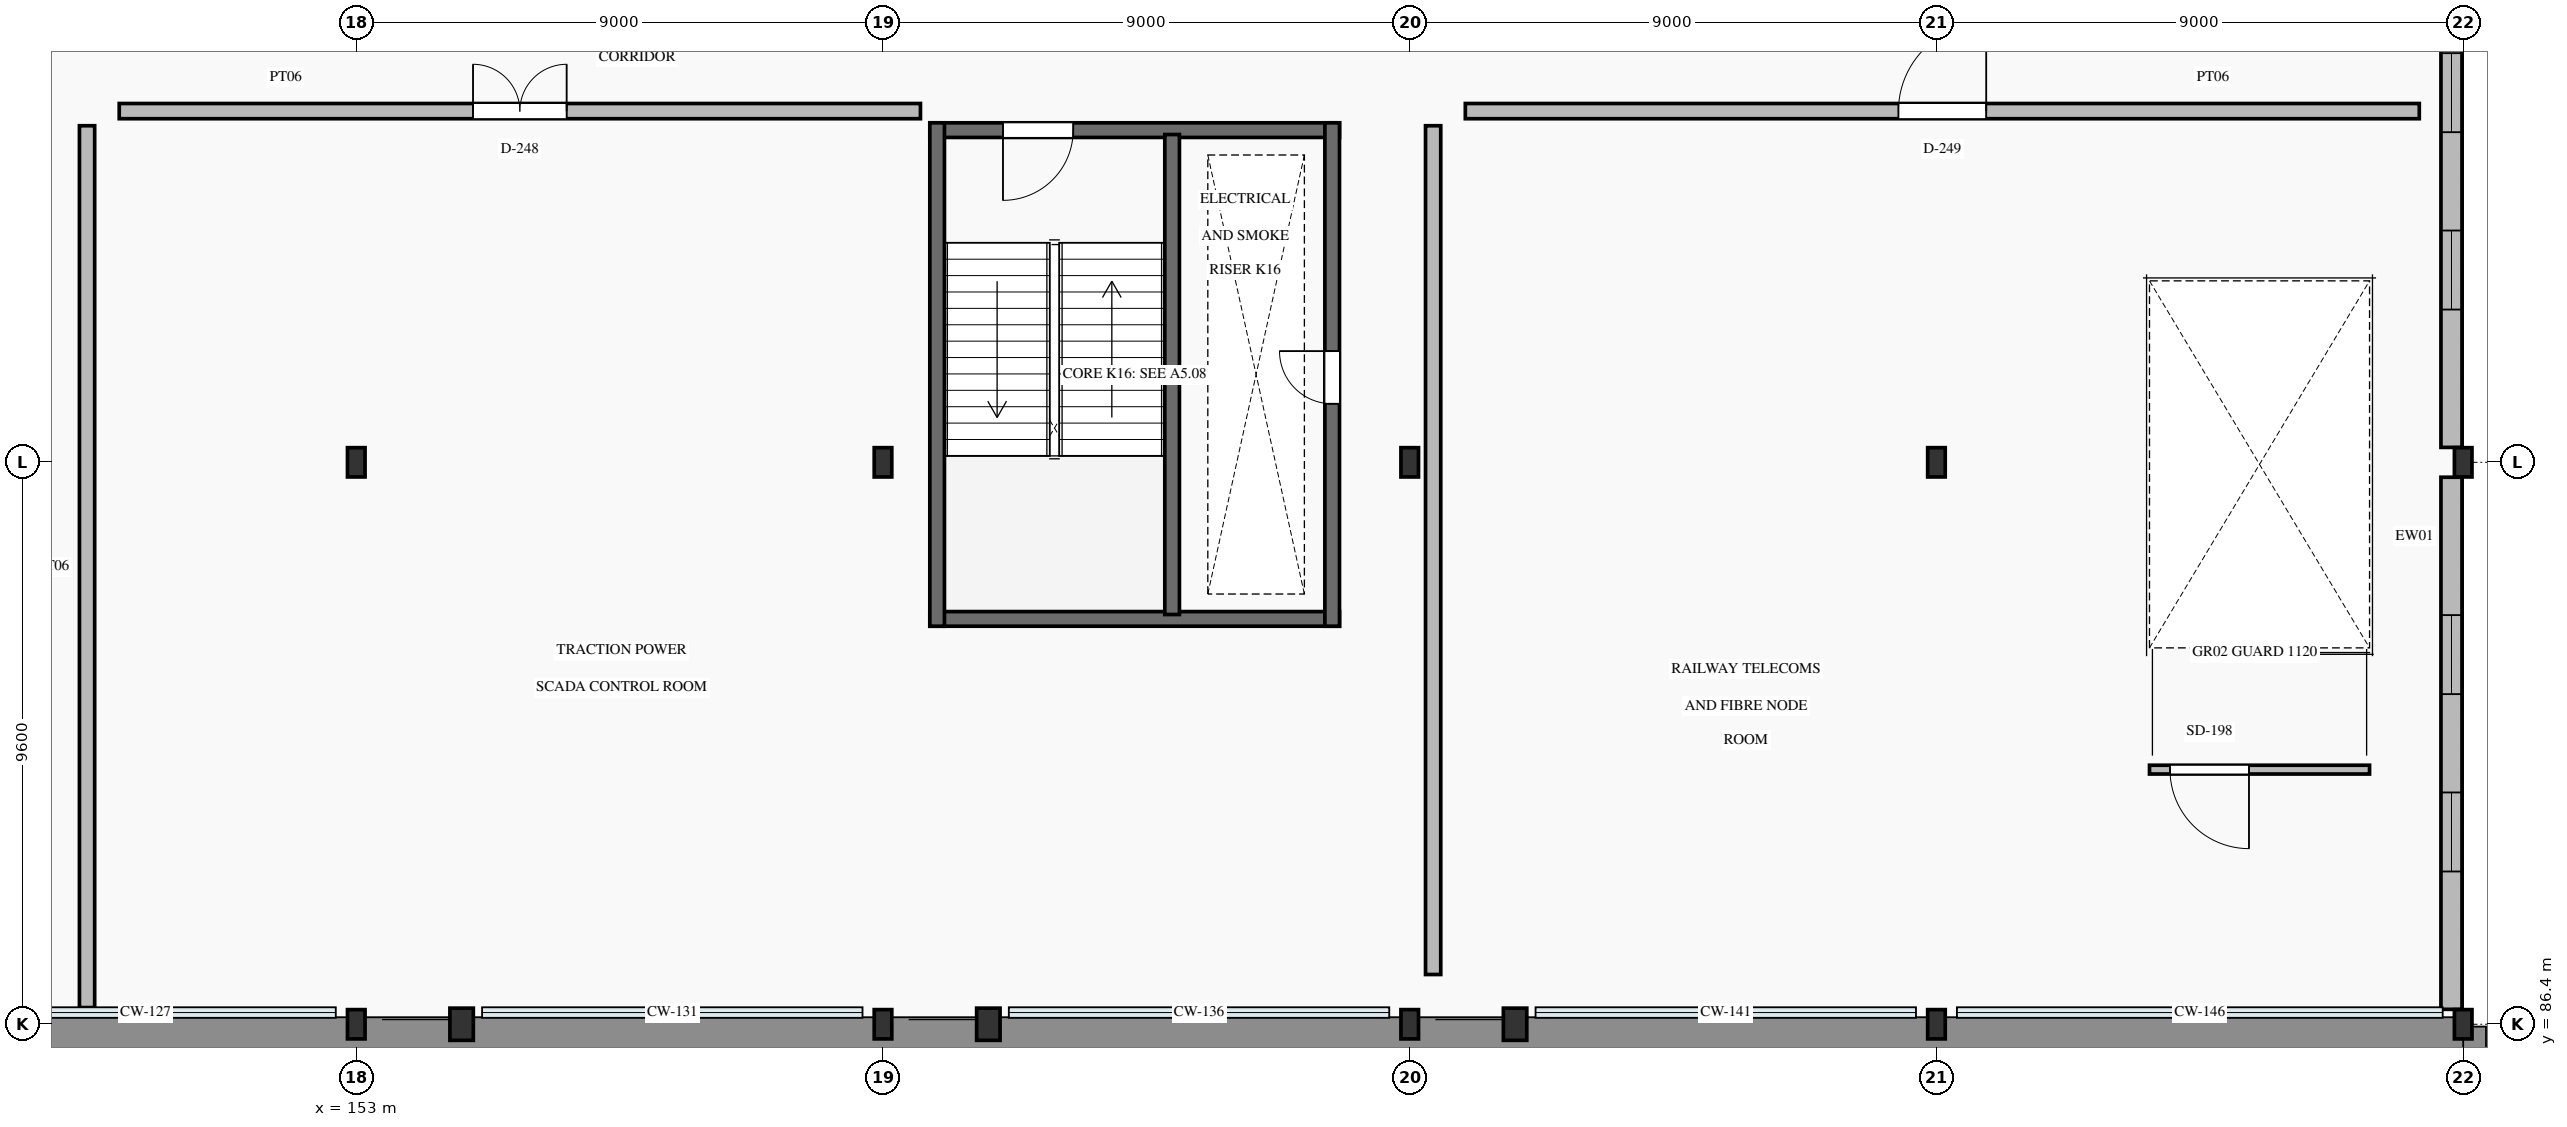
"""IFC4 building model, lengths in metres.
Left out: names, types, materials, properties, quantities, classifications, styles, units other than length and angle.
Written with IfcOpenShell. Run it as: python <this file> out.ifc"""

import sys

from ifc_helpers import new_model, si_unit, direction, frame, frame_2d, origin, origin_2d, place, context, subcontext, project, spatial, rectangle, i_section, extrude, element, fill, save


model = new_model("IFC4")
c1 = context("Model", 3, precision=1e-05, world=origin(), true_north=direction((0.0, 1.0)))
c2 = subcontext(c1, "Body", "Model", "MODEL_VIEW")
j1 = project(units=[si_unit("LENGTHUNIT", "METRE"), si_unit("PLANEANGLEUNIT", "RADIAN")], contexts=[c1])
p1 = place(None, origin())
s1 = spatial("IfcSite", under=j1, at=p1, CompositionType="ELEMENT")
p2 = place(p1, origin())
s2 = spatial("IfcBuilding", under=s1, at=p2, CompositionType="ELEMENT")
p3 = place(p2, frame((0.0, 0.0, 6.0)))
s3 = spatial("IfcBuildingStorey", under=s2, at=p3, CompositionType="ELEMENT", Elevation=6.0)
for number, where, z_axis, x_axis in (
    (1, (153.0, 86.4, 0.0), (0.0, 0.0, 1.0), (1.0, 0.0, 0.0)),
    (2, (153.0, 96.0, 0.0), (0.0, 0.0, 1.0), (1.0, 0.0, 0.0)),
    (3, (162.0, 86.4, 0.0), (0.0, 0.0, 1.0), (1.0, 0.0, 0.0)),
    (4, (162.0, 96.0, 0.0), (0.0, 0.0, 1.0), (1.0, 0.0, 0.0)),
    (5, (171.0, 86.4, 0.0), (0.0, 0.0, 1.0), (1.0, 0.0, 0.0)),
    (6, (171.0, 96.0, 0.0), (0.0, 0.0, 1.0), (1.0, 0.0, 0.0)),
    (7, (180.0, 86.4, 0.0), (0.0, 0.0, 1.0), (1.0, 0.0, 0.0)),
    (8, (180.0, 96.0, 0.0), (0.0, 0.0, 1.0), (1.0, 0.0, 0.0)),
    (9, (189.0, 86.4, 0.0), (0.0, 0.0, 1.0), (1.0, 0.0, 0.0)),
    (10, (189.0, 96.0, 0.0), (0.0, 0.0, 1.0), (1.0, 0.0, 0.0)),
):
    element("IfcColumn", number, at=place(p3, frame(where, z_axis=z_axis, x_axis=x_axis)), inside=s3, PredefinedType="COLUMN", context=c2, shape_type="SweptSolid", body=[
        extrude(i_section(OverallWidth=0.3, OverallDepth=0.5, WebThickness=0.014, FlangeThickness=0.028, FilletRadius=0.027, at=origin_2d()), origin(), (0.0, 0.0, 1.0), 4.8),
    ])
for number, where, z_axis, x_axis in (
    (11, (154.8, 86.4, 0.0), (0.0, 0.0, 1.0), (1.0, 0.0, 0.0)),
    (12, (163.8, 86.4, 0.0), (0.0, 0.0, 1.0), (1.0, 0.0, 0.0)),
    (13, (172.8, 86.4, 0.0), (0.0, 0.0, 1.0), (1.0, 0.0, 0.0)),
):
    element("IfcColumn", number, at=place(p3, frame(where, z_axis=z_axis, x_axis=x_axis)), inside=s3, PredefinedType="PILASTER", context=c2, shape_type="SweptSolid", body=[
        extrude(rectangle(XDim=0.4, YDim=0.55, at=origin_2d()), origin(), (0.0, 0.0, 1.0), 4.8),
    ])
p4 = place(p3, frame((188.8, 86.655, 0.0), z_axis=(0.0, 0.0, 1.0), x_axis=(0.0, 1.0, 0.0)))
e14 = element("IfcWall", 14, at=p4, inside=s3, PredefinedType="SOLIDWALL", context=c2, shape_type="SweptSolid", body=[
    extrude(rectangle(XDim=9.09, YDim=0.36, at=frame_2d((4.545, 0.0))), origin(), (0.0, 0.0, 1.0), 4.28),
])
p5 = place(p4, frame((2.355, 0.0, 0.95)))
e15 = element("IfcOpeningElement", 15, at=p5, cuts=e14, PredefinedType="OPENING", context=c2, shape_type="SweptSolid", body=[
    extrude(rectangle(XDim=1.35, YDim=1.95, at=frame_2d((0.675, 0.975))), frame((0.0, 0.195, 0.0), z_axis=(0.0, -1.0, 0.0), x_axis=(1.0, 0.0, 0.0)), (0.0, 0.0, 1.0), 0.39),
])
p6 = place(p4, frame((5.385, 0.0, 0.95)))
e16 = element("IfcOpeningElement", 16, at=p6, cuts=e14, PredefinedType="OPENING", context=c2, shape_type="SweptSolid", body=[
    extrude(rectangle(XDim=1.35, YDim=1.95, at=frame_2d((0.675, 0.975))), frame((0.0, 0.195, 0.0), z_axis=(0.0, -1.0, 0.0), x_axis=(1.0, 0.0, 0.0)), (0.0, 0.0, 1.0), 0.39),
])
p7 = place(p3, frame((188.8, 96.255, 0.0), z_axis=(0.0, 0.0, 1.0), x_axis=(0.0, 1.0, 0.0)))
e17 = element("IfcWall", 17, at=p7, inside=s3, PredefinedType="SOLIDWALL", context=c2, shape_type="SweptSolid", body=[
    extrude(rectangle(XDim=9.09, YDim=0.36, at=frame_2d((4.545, 0.0))), origin(), (0.0, 0.0, 1.0), 4.28),
])
p8 = place(p7, frame((2.355, 0.0, 0.95)))
e18 = element("IfcOpeningElement", 18, at=p8, cuts=e17, PredefinedType="OPENING", context=c2, shape_type="SweptSolid", body=[
    extrude(rectangle(XDim=1.35, YDim=1.95, at=frame_2d((0.675, 0.975))), frame((0.0, 0.195, 0.0), z_axis=(0.0, -1.0, 0.0), x_axis=(1.0, 0.0, 0.0)), (0.0, 0.0, 1.0), 0.39),
])
p9 = place(p7, frame((5.385, 0.0, 0.95)))
e19 = element("IfcOpeningElement", 19, at=p9, cuts=e17, PredefinedType="OPENING", context=c2, shape_type="SweptSolid", body=[
    extrude(rectangle(XDim=1.35, YDim=1.95, at=frame_2d((0.675, 0.975))), frame((0.0, 0.195, 0.0), z_axis=(0.0, -1.0, 0.0), x_axis=(1.0, 0.0, 0.0)), (0.0, 0.0, 1.0), 0.39),
])
p10 = place(p3, frame((162.8, 93.325, 0.0), z_axis=(0.0, 0.0, 1.0), x_axis=(1.0, 0.0, 0.0)))
e20 = element("IfcWall", 20, at=p10, inside=s3, PredefinedType="SHEAR", context=c2, shape_type="SweptSolid", body=[
    extrude(rectangle(XDim=7.0, YDim=0.25, at=frame_2d((3.5, 0.0))), origin(), (0.0, 0.0, 1.0), 4.8),
])
p11 = place(p3, frame((162.8, 101.675, 0.0), z_axis=(0.0, 0.0, 1.0), x_axis=(1.0, 0.0, 0.0)))
e21 = element("IfcWall", 21, at=p11, inside=s3, PredefinedType="SHEAR", context=c2, shape_type="SweptSolid", body=[
    extrude(rectangle(XDim=7.0, YDim=0.25, at=frame_2d((3.5, 0.0))), origin(), (0.0, 0.0, 1.0), 4.8),
])
p12 = place(p11, frame((1.25, 0.0, 0.0)))
e22 = element("IfcOpeningElement", 22, at=p12, cuts=e21, PredefinedType="OPENING", context=c2, shape_type="SweptSolid", body=[
    extrude(rectangle(XDim=1.2, YDim=2.15, at=frame_2d((0.6, 1.075))), frame((0.0, 0.14, 0.0), z_axis=(0.0, -1.0, 0.0), x_axis=(1.0, 0.0, 0.0)), (0.0, 0.0, 1.0), 0.28),
])
p13 = place(p3, frame((162.925, 93.2, 0.0), z_axis=(0.0, 0.0, 1.0), x_axis=(0.0, 1.0, 0.0)))
e23 = element("IfcWall", 23, at=p13, inside=s3, PredefinedType="SHEAR", context=c2, shape_type="SweptSolid", body=[
    extrude(rectangle(XDim=8.6, YDim=0.25, at=frame_2d((4.3, 0.0))), origin(), (0.0, 0.0, 1.0), 4.8),
])
p14 = place(p3, frame((169.675, 93.2, 0.0), z_axis=(0.0, 0.0, 1.0), x_axis=(0.0, 1.0, 0.0)))
e24 = element("IfcWall", 24, at=p14, inside=s3, PredefinedType="SHEAR", context=c2, shape_type="SweptSolid", body=[
    extrude(rectangle(XDim=8.6, YDim=0.25, at=frame_2d((4.3, 0.0))), origin(), (0.0, 0.0, 1.0), 4.8),
])
p15 = place(p14, frame((3.8, 0.0, 0.0)))
e25 = element("IfcOpeningElement", 25, at=p15, cuts=e24, PredefinedType="OPENING", context=c2, shape_type="SweptSolid", body=[
    extrude(rectangle(XDim=0.9, YDim=2.05, at=frame_2d((0.45, 1.025))), frame((0.0, 0.14, 0.0), z_axis=(0.0, -1.0, 0.0), x_axis=(1.0, 0.0, 0.0)), (0.0, 0.0, 1.0), 0.28),
])
p16 = place(p3, frame((166.94, 93.4, 0.0), z_axis=(0.0, 0.0, 1.0), x_axis=(0.0, 1.0, 0.0)))
e26 = element("IfcWall", 26, at=p16, inside=s3, PredefinedType="SHEAR", context=c2, shape_type="SweptSolid", body=[
    extrude(rectangle(XDim=8.2, YDim=0.25, at=frame_2d((4.1, 0.0))), origin(), (0.0, 0.0, 1.0), 4.8),
])
p17 = place(p3, frame((183.64, 90.75, 0.0), z_axis=(0.0, 0.0, 1.0), x_axis=(1.0, 0.0, 0.0)))
e27 = element("IfcWall", 27, at=p17, inside=s3, PredefinedType="PARTITIONING", context=c2, shape_type="SweptSolid", body=[
    extrude(rectangle(XDim=3.76, YDim=0.15, at=frame_2d((1.88, 0.0))), origin(), (0.0, 0.0, 1.0), 4.53),
])
p18 = place(p17, frame((0.35, 0.0, 0.0)))
e28 = element("IfcOpeningElement", 28, at=p18, cuts=e27, PredefinedType="OPENING", context=c2, shape_type="SweptSolid", body=[
    extrude(rectangle(XDim=1.35, YDim=2.2, at=frame_2d((0.675, 1.1))), frame((0.0, 0.09, 0.0), z_axis=(0.0, -1.0, 0.0), x_axis=(1.0, 0.0, 0.0)), (0.0, 0.0, 1.0), 0.18),
])
p19 = place(p3, frame((148.95, 102.0, 0.0), z_axis=(0.0, 0.0, 1.0), x_axis=(1.0, 0.0, 0.0)))
e29 = element("IfcWall", 29, at=p19, inside=s3, PredefinedType="PARTITIONING", context=c2, shape_type="SweptSolid", body=[
    extrude(rectangle(XDim=13.69, YDim=0.26, at=frame_2d((6.845, 0.0))), origin(), (0.0, 0.0, 1.0), 4.53),
])
p20 = place(p19, frame((6.045, 0.0, 0.0)))
e30 = element("IfcOpeningElement", 30, at=p20, cuts=e29, PredefinedType="OPENING", context=c2, shape_type="SweptSolid", body=[
    extrude(rectangle(XDim=1.6, YDim=2.25, at=frame_2d((0.8, 1.125))), frame((0.0, 0.145, 0.0), z_axis=(0.0, -1.0, 0.0), x_axis=(1.0, 0.0, 0.0)), (0.0, 0.0, 1.0), 0.29),
])
p21 = place(p3, frame((171.95, 102.0, 0.0), z_axis=(0.0, 0.0, 1.0), x_axis=(1.0, 0.0, 0.0)))
e31 = element("IfcWall", 31, at=p21, inside=s3, PredefinedType="PARTITIONING", context=c2, shape_type="SweptSolid", body=[
    extrude(rectangle(XDim=16.3, YDim=0.26, at=frame_2d((8.15, 0.0))), origin(), (0.0, 0.0, 1.0), 4.53),
])
p22 = place(p21, frame((7.4, 0.0, 0.0)))
e32 = element("IfcOpeningElement", 32, at=p22, cuts=e31, PredefinedType="OPENING", context=c2, shape_type="SweptSolid", body=[
    extrude(rectangle(XDim=1.5, YDim=2.25, at=frame_2d((0.75, 1.125))), frame((0.0, 0.145, 0.0), z_axis=(0.0, -1.0, 0.0), x_axis=(1.0, 0.0, 0.0)), (0.0, 0.0, 1.0), 0.29),
])
p23 = place(p3, frame((148.4, 86.685, 0.0), z_axis=(0.0, 0.0, 1.0), x_axis=(0.0, 1.0, 0.0)))
e33 = element("IfcWall", 33, at=p23, inside=s3, PredefinedType="PARTITIONING", context=c2, shape_type="SweptSolid", body=[
    extrude(rectangle(XDim=15.065, YDim=0.26, at=frame_2d((7.532, 0.0))), origin(), (0.0, 0.0, 1.0), 4.53),
])
p24 = place(p3, frame((171.4, 87.25, 0.0), z_axis=(0.0, 0.0, 1.0), x_axis=(0.0, 1.0, 0.0)))
e34 = element("IfcWall", 34, at=p24, inside=s3, PredefinedType="PARTITIONING", context=c2, shape_type="SweptSolid", body=[
    extrude(rectangle(XDim=14.5, YDim=0.26, at=frame_2d((7.25, 0.0))), origin(), (0.0, 0.0, 1.0), 4.53),
])
p25 = place(p5, origin())
e35 = element("IfcWindow", 35, at=p25, inside=s3, PartitioningType="SINGLE_PANEL", PredefinedType="WINDOW", context=c2, shape_type="SweptSolid", body=[
    extrude(rectangle(XDim=1.35, YDim=1.95, at=frame_2d((0.675, 0.975))), frame((0.0, 0.03, 0.0), z_axis=(0.0, -1.0, 0.0), x_axis=(1.0, 0.0, 0.0)), (0.0, 0.0, 1.0), 0.06),
])
fill(e15, e35)
p26 = place(p6, origin())
e36 = element("IfcWindow", 36, at=p26, inside=s3, PartitioningType="SINGLE_PANEL", PredefinedType="WINDOW", context=c2, shape_type="SweptSolid", body=[
    extrude(rectangle(XDim=1.35, YDim=1.95, at=frame_2d((0.675, 0.975))), frame((0.0, 0.03, 0.0), z_axis=(0.0, -1.0, 0.0), x_axis=(1.0, 0.0, 0.0)), (0.0, 0.0, 1.0), 0.06),
])
fill(e16, e36)
p27 = place(p8, origin())
e37 = element("IfcWindow", 37, at=p27, inside=s3, PartitioningType="SINGLE_PANEL", PredefinedType="WINDOW", context=c2, shape_type="SweptSolid", body=[
    extrude(rectangle(XDim=1.35, YDim=1.95, at=frame_2d((0.675, 0.975))), frame((0.0, 0.03, 0.0), z_axis=(0.0, -1.0, 0.0), x_axis=(1.0, 0.0, 0.0)), (0.0, 0.0, 1.0), 0.06),
])
fill(e18, e37)
p28 = place(p9, origin())
e38 = element("IfcWindow", 38, at=p28, inside=s3, PartitioningType="SINGLE_PANEL", PredefinedType="WINDOW", context=c2, shape_type="SweptSolid", body=[
    extrude(rectangle(XDim=1.35, YDim=1.95, at=frame_2d((0.675, 0.975))), frame((0.0, 0.03, 0.0), z_axis=(0.0, -1.0, 0.0), x_axis=(1.0, 0.0, 0.0)), (0.0, 0.0, 1.0), 0.06),
])
fill(e19, e38)
p29 = place(p12, frame((1.2, 0.0, 0.0), z_axis=(0.0, 0.0, 1.0), x_axis=(-1.0, 0.0, 0.0)))
e39 = element("IfcDoor", 39, at=p29, inside=s3, OperationType="SINGLE_SWING_LEFT", PredefinedType="DOOR", context=c2, shape_type="SweptSolid", body=[
    extrude(rectangle(XDim=1.2, YDim=2.15, at=frame_2d((0.6, 1.075))), frame((0.0, 0.025, 0.0), z_axis=(0.0, -1.0, 0.0), x_axis=(1.0, 0.0, 0.0)), (0.0, 0.0, 1.0), 0.05),
])
fill(e22, e39)
p30 = place(p15, origin())
e40 = element("IfcDoor", 40, at=p30, inside=s3, OperationType="SINGLE_SWING_RIGHT", PredefinedType="DOOR", context=c2, shape_type="SweptSolid", body=[
    extrude(rectangle(XDim=0.9, YDim=2.05, at=frame_2d((0.45, 1.025))), frame((0.0, 0.025, 0.0), z_axis=(0.0, -1.0, 0.0), x_axis=(1.0, 0.0, 0.0)), (0.0, 0.0, 1.0), 0.05),
])
fill(e25, e40)
p31 = place(p18, frame((1.35, 0.0, 0.0), z_axis=(0.0, 0.0, 1.0), x_axis=(-1.0, 0.0, 0.0)))
e41 = element("IfcDoor", 41, at=p31, inside=s3, OperationType="SINGLE_SWING_RIGHT", PredefinedType="DOOR", context=c2, shape_type="SweptSolid", body=[
    extrude(rectangle(XDim=1.35, YDim=2.2, at=frame_2d((0.675, 1.1))), frame((0.0, 0.025, 0.0), z_axis=(0.0, -1.0, 0.0), x_axis=(1.0, 0.0, 0.0)), (0.0, 0.0, 1.0), 0.05),
])
fill(e28, e41)
p32 = place(p20, origin())
e42 = element("IfcDoor", 42, at=p32, inside=s3, OperationType="DOUBLE_DOOR_SINGLE_SWING", PredefinedType="DOOR", context=c2, shape_type="SweptSolid", body=[
    extrude(rectangle(XDim=1.6, YDim=2.25, at=frame_2d((0.8, 1.125))), frame((0.0, 0.025, 0.0), z_axis=(0.0, -1.0, 0.0), x_axis=(1.0, 0.0, 0.0)), (0.0, 0.0, 1.0), 0.05),
])
fill(e30, e42)
p33 = place(p22, origin())
e43 = element("IfcDoor", 43, at=p33, inside=s3, OperationType="SINGLE_SWING_RIGHT", PredefinedType="DOOR", context=c2, shape_type="SweptSolid", body=[
    extrude(rectangle(XDim=1.5, YDim=2.25, at=frame_2d((0.75, 1.125))), frame((0.0, 0.025, 0.0), z_axis=(0.0, -1.0, 0.0), x_axis=(1.0, 0.0, 0.0)), (0.0, 0.0, 1.0), 0.05),
])
fill(e32, e43)
save(model, sys.argv[1])
